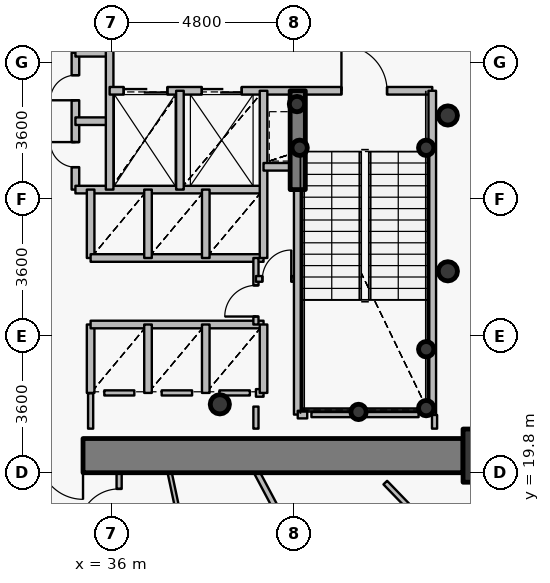
"""IFC4 building model, lengths in metres.
Left out: names, types, materials, properties, quantities, classifications, styles, units other than length and angle.
Written with IfcOpenShell. Run it as: python <this file> out.ifc"""

import sys

from ifc_helpers import new_model, si_unit, direction, frame, frame_2d, origin, origin_2d, place, context, subcontext, project, spatial, rectangle, hollow_circle, extrude, source, transform, mapped, element, fill, save


model = new_model("IFC4")
c1 = context("Model", 3, precision=1e-05, world=origin(), true_north=direction((0.0, 1.0)))
c2 = subcontext(c1, "Body", "Model", "MODEL_VIEW")
j1 = project(units=[si_unit("LENGTHUNIT", "METRE"), si_unit("PLANEANGLEUNIT", "RADIAN")], contexts=[c1])
p1 = place(None, origin())
s1 = spatial("IfcSite", under=j1, at=p1, CompositionType="ELEMENT")
p2 = place(p1, origin())
s2 = spatial("IfcBuilding", under=s1, at=p2, CompositionType="ELEMENT")
p3 = place(p2, frame((0.0, 0.0, 14.4)))
s3 = spatial("IfcBuildingStorey", under=s2, at=p3, CompositionType="ELEMENT", Elevation=14.4)
p4 = place(p3, frame((45.95, 20.25, 0.0), z_axis=(0.0, 0.0, 1.0), x_axis=(1.0, 0.0, 0.0)))
e1 = element("IfcColumn", 1, at=p4, inside=s3, PredefinedType="COLUMN", context=c2, shape_type="SweptSolid", body=[
    extrude(rectangle(XDim=1.4, YDim=1.4, at=origin_2d()), origin(), (0.0, 0.0, 1.0), 4.2),
])
p5 = place(p3, frame((38.85, 21.6, 0.0), z_axis=(0.0, 0.0, 1.0), x_axis=(1.0, 0.0, 0.0)))
e2 = element("IfcColumn", 2, at=p5, inside=s3, PredefinedType="COLUMN", context=c2, shape_type="SweptSolid", body=[
    extrude(hollow_circle(Radius=0.254, WallThickness=0.02, at=origin_2d()), origin(), (0.0, 0.0, 1.0), 4.2),
])
for number, where, z_axis, x_axis in (
    (3, (44.28, 21.5, 0.0), (0.0, 0.0, 1.0), (1.0, 0.0, 0.0)),
    (4, (44.28, 23.05, 0.0), (0.0, 0.0, 1.0), (1.0, 0.0, 0.0)),
    (5, (42.5, 21.4, 0.0), (0.0, 0.0, 1.0), (1.0, 0.0, 0.0)),
    (6, (40.95, 28.35, 0.0), (0.0, 0.0, 1.0), (1.0, 0.0, 0.0)),
    (7, (44.28, 28.35, 0.0), (0.0, 0.0, 1.0), (1.0, 0.0, 0.0)),
    (8, (40.88, 29.5, 0.0), (0.0, 0.0, 1.0), (1.0, 0.0, 0.0)),
):
    element("IfcColumn", number, at=place(p3, frame(where, z_axis=z_axis, x_axis=x_axis)), inside=s3, PredefinedType="COLUMN", context=c2, shape_type="SweptSolid", body=[
        extrude(hollow_circle(Radius=0.203, WallThickness=0.016, at=origin_2d()), origin(), (0.0, 0.0, 1.0), 4.2),
    ])
p6 = place(p3, frame((45.25, 20.25, 0.0), z_axis=(0.0, 0.0, 1.0), x_axis=(-1.0, 0.0, 0.0)))
e9 = element("IfcWall", 9, at=p6, inside=s3, PredefinedType="SHEAR", context=c2, shape_type="SweptSolid", body=[
    extrude(rectangle(XDim=18.5, YDim=0.9, at=frame_2d((9.25, 0.0))), origin(), (0.0, 0.0, 1.0), 3.35),
])
p7 = place(p6, frame((10.0, 0.0, 0.0)))
e10 = element("IfcOpeningElement", 10, at=p7, cuts=e9, PredefinedType="OPENING", context=c2, shape_type="SweptSolid", body=[
    extrude(rectangle(XDim=1.15, YDim=2.15, at=origin_2d()), frame((0.575, 0.46, 1.075), z_axis=(0.0, -1.0, 0.0), x_axis=(1.0, 0.0, 0.0)), (0.0, 0.0, 1.0), 0.92),
])
p8 = place(p3, frame((40.9, 27.25, 0.0), z_axis=(0.0, 0.0, 1.0), x_axis=(0.0, 1.0, 0.0)))
e11 = element("IfcWall", 11, at=p8, inside=s3, PredefinedType="SHEAR", context=c2, shape_type="SweptSolid", body=[
    extrude(rectangle(XDim=2.6, YDim=0.4, at=frame_2d((1.3, 0.0))), origin(), (0.0, 0.0, 1.0), 3.5),
])
for number, where, z_axis, x_axis in (
    (12, (44.85, 25.1, 0.0), (0.0, 0.0, 1.0), (1.0, 0.0, 0.0)),
    (13, (44.85, 29.2, 0.0), (0.0, 0.0, 1.0), (1.0, 0.0, 0.0)),
):
    element("IfcColumn", number, at=place(p3, frame(where, z_axis=z_axis, x_axis=x_axis)), inside=s3, PredefinedType="COLUMN", context=c2, shape_type="SweptSolid", body=[
        extrude(hollow_circle(Radius=0.254, WallThickness=0.02, at=origin_2d()), origin(), (0.0, 0.0, 1.0), 4.2),
    ])
p9 = place(p3, frame((35.05, 27.25, 0.0), z_axis=(0.0, 0.0, 1.0), x_axis=(0.0, 1.0, 0.0)))
e14 = element("IfcWall", 14, at=p9, inside=s3, PredefinedType="PARTITIONING", context=c2, shape_type="SweptSolid", body=[
    extrude(rectangle(XDim=3.6, YDim=0.2, at=frame_2d((1.8, 0.0))), origin(), (0.0, 0.0, 1.0), 3.9),
])
p10 = place(p9, frame((0.59, 0.0, 0.0)))
e15 = element("IfcOpeningElement", 15, at=p10, cuts=e14, PredefinedType="OPENING", context=c2, shape_type="SweptSolid", body=[
    extrude(rectangle(XDim=0.66, YDim=2.05, at=origin_2d()), frame((0.33, 0.11, 1.025), z_axis=(0.0, -1.0, 0.0), x_axis=(1.0, 0.0, 0.0)), (0.0, 0.0, 1.0), 0.22),
])
p11 = place(p9, frame((2.35, 0.0, 0.0)))
e16 = element("IfcOpeningElement", 16, at=p11, cuts=e14, PredefinedType="OPENING", context=c2, shape_type="SweptSolid", body=[
    extrude(rectangle(XDim=0.66, YDim=2.05, at=origin_2d()), frame((0.33, 0.11, 1.025), z_axis=(0.0, -1.0, 0.0), x_axis=(1.0, 0.0, 0.0)), (0.0, 0.0, 1.0), 0.22),
])
p12 = place(p3, frame((35.05, 27.25, 0.0), z_axis=(0.0, 0.0, 1.0), x_axis=(1.0, 0.0, 0.0)))
e17 = element("IfcWall", 17, at=p12, inside=s3, PredefinedType="PARTITIONING", context=c2, shape_type="SweptSolid", body=[
    extrude(rectangle(XDim=4.95, YDim=0.2, at=frame_2d((2.475, 0.0))), origin(), (0.0, 0.0, 1.0), 3.485),
])
for number, where, z_axis, x_axis in (
    (18, (35.05, 29.05, 0.0), (0.0, 0.0, 1.0), (1.0, 0.0, 0.0)),
    (19, (35.05, 30.85, 0.0), (0.0, 0.0, 1.0), (1.0, 0.0, 0.0)),
):
    element("IfcWall", number, at=place(p3, frame(where, z_axis=z_axis, x_axis=x_axis)), inside=s3, PredefinedType="PARTITIONING", context=c2, shape_type="SweptSolid", body=[
        extrude(rectangle(XDim=0.9, YDim=0.2, at=frame_2d((0.45, 0.0))), origin(), (0.0, 0.0, 1.0), 3.9),
    ])
p13 = place(p3, frame((35.45, 21.9, 0.0), z_axis=(0.0, 0.0, 1.0), x_axis=(0.0, 1.0, 0.0)))
e20 = element("IfcWall", 20, at=p13, inside=s3, PredefinedType="PARTITIONING", context=c2, shape_type="SweptSolid", body=[
    extrude(rectangle(XDim=1.8, YDim=0.2, at=frame_2d((0.9, 0.0))), origin(), (0.0, 0.0, 1.0), 3.9),
])
p14 = place(p3, frame((35.45, 23.7, 0.0), z_axis=(0.0, 0.0, 1.0), x_axis=(1.0, 0.0, 0.0)))
e21 = element("IfcWall", 21, at=p14, inside=s3, PredefinedType="PARTITIONING", context=c2, shape_type="SweptSolid", body=[
    extrude(rectangle(XDim=4.55, YDim=0.2, at=frame_2d((2.275, 0.0))), origin(), (0.0, 0.0, 1.0), 3.485),
])
p15 = place(p3, frame((35.45, 25.45, 0.0), z_axis=(0.0, 0.0, 1.0), x_axis=(0.0, 1.0, 0.0)))
e22 = element("IfcWall", 22, at=p15, inside=s3, PredefinedType="PARTITIONING", context=c2, shape_type="SweptSolid", body=[
    extrude(rectangle(XDim=1.8, YDim=0.2, at=frame_2d((0.9, 0.0))), origin(), (0.0, 0.0, 1.0), 3.9),
])
p16 = place(p3, frame((35.45, 25.45, 0.0), z_axis=(0.0, 0.0, 1.0), x_axis=(1.0, 0.0, 0.0)))
e23 = element("IfcWall", 23, at=p16, inside=s3, PredefinedType="PARTITIONING", context=c2, shape_type="SweptSolid", body=[
    extrude(rectangle(XDim=4.55, YDim=0.2, at=frame_2d((2.275, 0.0))), origin(), (0.0, 0.0, 1.0), 3.485),
])
p17 = place(p3, frame((35.95, 27.25, 0.0), z_axis=(0.0, 0.0, 1.0), x_axis=(0.0, 1.0, 0.0)))
e24 = element("IfcWall", 24, at=p17, inside=s3, PredefinedType="PARTITIONING", context=c2, shape_type="SweptSolid", body=[
    extrude(rectangle(XDim=3.8, YDim=0.2, at=frame_2d((1.9, 0.0))), origin(), (0.0, 0.0, 1.0), 3.9),
])
p18 = place(p3, frame((35.95, 29.85, 0.0), z_axis=(0.0, 0.0, 1.0), x_axis=(1.0, 0.0, 0.0)))
e25 = element("IfcWall", 25, at=p18, inside=s3, PredefinedType="PARTITIONING", context=c2, shape_type="SweptSolid", body=[
    extrude(rectangle(XDim=8.49, YDim=0.2, at=frame_2d((4.245, 0.0))), origin(), (0.0, 0.0, 1.0), 3.485),
])
p19 = place(p18, frame((6.1, 0.0, 0.0)))
e26 = element("IfcOpeningElement", 26, at=p19, cuts=e25, PredefinedType="OPENING", context=c2, shape_type="SweptSolid", body=[
    extrude(rectangle(XDim=1.2, YDim=2.15, at=origin_2d()), frame((0.6, 0.11, 1.075), z_axis=(0.0, -1.0, 0.0), x_axis=(1.0, 0.0, 0.0)), (0.0, 0.0, 1.0), 0.22),
])
p20 = place(p18, frame((0.37, 0.0, 0.0)))
e27 = element("IfcOpeningElement", 27, at=p20, cuts=e25, PredefinedType="OPENING", context=c2, shape_type="SweptSolid", body=[
    extrude(rectangle(XDim=1.15, YDim=2.15, at=origin_2d()), frame((0.575, 0.11, 1.075), z_axis=(0.0, -1.0, 0.0), x_axis=(1.0, 0.0, 0.0)), (0.0, 0.0, 1.0), 0.22),
])
p21 = place(p18, frame((2.425, 0.0, 0.0)))
e28 = element("IfcOpeningElement", 28, at=p21, cuts=e25, PredefinedType="OPENING", context=c2, shape_type="SweptSolid", body=[
    extrude(rectangle(XDim=1.05, YDim=2.15, at=origin_2d()), frame((0.525, 0.11, 1.075), z_axis=(0.0, -1.0, 0.0), x_axis=(1.0, 0.0, 0.0)), (0.0, 0.0, 1.0), 0.22),
])
p22 = place(p3, frame((36.2, 17.9, 0.0), z_axis=(0.0, 0.0, 1.0), x_axis=(0.0, 1.0, 0.0)))
e29 = element("IfcWall", 29, at=p22, inside=s3, PredefinedType="PARTITIONING", context=c2, shape_type="SweptSolid", body=[
    extrude(rectangle(XDim=1.9, YDim=0.135, at=frame_2d((0.95, 0.0))), origin(), (0.0, 0.0, 1.0), 3.085),
])
p23 = place(p22, frame((0.425, 0.0, 0.0)))
e30 = element("IfcOpeningElement", 30, at=p23, cuts=e29, PredefinedType="OPENING", context=c2, shape_type="SweptSolid", body=[
    extrude(rectangle(XDim=1.05, YDim=2.15, at=origin_2d()), frame((0.525, 0.078, 1.075), z_axis=(0.0, -1.0, 0.0), x_axis=(1.0, 0.0, 0.0)), (0.0, 0.0, 1.0), 0.155),
])
for number, where, z_axis, x_axis in (
    (31, (36.96, 21.9, 0.0), (0.0, 0.0, 1.0), (0.0, 1.0, 0.0)),
    (32, (36.96, 25.45, 0.0), (0.0, 0.0, 1.0), (0.0, 1.0, 0.0)),
):
    element("IfcWall", number, at=place(p3, frame(where, z_axis=z_axis, x_axis=x_axis)), inside=s3, PredefinedType="PARTITIONING", context=c2, shape_type="SweptSolid", body=[
        extrude(rectangle(XDim=1.8, YDim=0.2, at=frame_2d((0.9, 0.0))), origin(), (0.0, 0.0, 1.0), 3.9),
    ])
p24 = place(p3, frame((37.531, 19.8, 0.0), z_axis=(0.0, 0.0, 1.0), x_axis=(0.207904603096, -0.978149107249, 0.0)))
e33 = element("IfcWall", 33, at=p24, inside=s3, PredefinedType="MOVABLE", context=c2, shape_type="SweptSolid", body=[
    extrude(rectangle(XDim=18.724, YDim=0.11, at=frame_2d((9.362, 0.0))), origin(), (0.0, 0.0, 1.0), 3.085),
])
p25 = place(p24, frame((8.837, 0.0, 0.0)))
e34 = element("IfcOpeningElement", 34, at=p25, cuts=e33, PredefinedType="OPENING", context=c2, shape_type="SweptSolid", body=[
    extrude(rectangle(XDim=1.05, YDim=2.15, at=origin_2d()), frame((0.525, 0.065, 1.075), z_axis=(0.0, -1.0, 0.0), x_axis=(1.0, 0.0, 0.0)), (0.0, 0.0, 1.0), 0.13),
])
p26 = place(p3, frame((37.8, 27.25, 0.0), z_axis=(0.0, 0.0, 1.0), x_axis=(0.0, 1.0, 0.0)))
e35 = element("IfcWall", 35, at=p26, inside=s3, PredefinedType="PARTITIONING", context=c2, shape_type="SweptSolid", body=[
    extrude(rectangle(XDim=2.6, YDim=0.2, at=frame_2d((1.3, 0.0))), origin(), (0.0, 0.0, 1.0), 3.9),
])
for number, where, z_axis, x_axis in (
    (36, (38.48, 21.9, 0.0), (0.0, 0.0, 1.0), (0.0, 1.0, 0.0)),
    (37, (38.48, 25.45, 0.0), (0.0, 0.0, 1.0), (0.0, 1.0, 0.0)),
):
    element("IfcWall", number, at=place(p3, frame(where, z_axis=z_axis, x_axis=x_axis)), inside=s3, PredefinedType="PARTITIONING", context=c2, shape_type="SweptSolid", body=[
        extrude(rectangle(XDim=1.8, YDim=0.2, at=frame_2d((0.9, 0.0))), origin(), (0.0, 0.0, 1.0), 3.9),
    ])
p27 = place(p3, frame((39.8, 21.9, 0.0), z_axis=(0.0, 0.0, 1.0), x_axis=(1.0, 0.0, 0.0)))
e38 = element("IfcWall", 38, at=p27, inside=s3, PredefinedType="PARTITIONING", context=c2, shape_type="SweptSolid", body=[
    extrude(rectangle(XDim=0.2, YDim=0.2, at=frame_2d((0.1, 0.0))), origin(), (0.0, 0.0, 1.0), 3.9),
])
p28 = place(p3, frame((39.8, 23.7, 0.0), z_axis=(0.0, 0.0, 1.0), x_axis=(0.0, 1.0, 0.0)))
e39 = element("IfcWall", 39, at=p28, inside=s3, PredefinedType="PARTITIONING", context=c2, shape_type="SweptSolid", body=[
    extrude(rectangle(XDim=1.75, YDim=0.135, at=frame_2d((0.875, 0.0))), origin(), (0.0, 0.0, 1.0), 3.9),
])
p29 = place(p28, frame((0.21, 0.0, 0.0)))
e40 = element("IfcOpeningElement", 40, at=p29, cuts=e39, PredefinedType="OPENING", context=c2, shape_type="SweptSolid", body=[
    extrude(rectangle(XDim=0.82, YDim=2.1, at=origin_2d()), frame((0.41, 0.078, 1.05), z_axis=(0.0, -1.0, 0.0), x_axis=(1.0, 0.0, 0.0)), (0.0, 0.0, 1.0), 0.155),
])
p30 = place(p3, frame((39.8, 24.9, 0.0), z_axis=(0.0, 0.0, 1.0), x_axis=(1.0, 0.0, 0.0)))
e41 = element("IfcWall", 41, at=p30, inside=s3, PredefinedType="PARTITIONING", context=c2, shape_type="SweptSolid", body=[
    extrude(rectangle(XDim=1.1, YDim=0.15, at=frame_2d((0.55, 0.0))), origin(), (0.0, 0.0, 1.0), 3.9),
])
p31 = place(p30, frame((0.17, 0.0, 0.0)))
e42 = element("IfcOpeningElement", 42, at=p31, cuts=e41, PredefinedType="OPENING", context=c2, shape_type="SweptSolid", body=[
    extrude(rectangle(XDim=0.76, YDim=2.1, at=origin_2d()), frame((0.38, 0.085, 1.05), z_axis=(0.0, -1.0, 0.0), x_axis=(1.0, 0.0, 0.0)), (0.0, 0.0, 1.0), 0.17),
])
p32 = place(p3, frame((39.828, 19.8, 0.0), z_axis=(0.0, 0.0, 1.0), x_axis=(0.469463695446, -0.882951775953, 0.0)))
e43 = element("IfcWall", 43, at=p32, inside=s3, PredefinedType="PARTITIONING", context=c2, shape_type="SweptSolid", body=[
    extrude(rectangle(XDim=18.824, YDim=0.15, at=frame_2d((9.412, 0.0))), origin(), (0.0, 0.0, 1.0), 3.085),
])
p33 = place(p3, frame((40.0, 21.9, 0.0), z_axis=(0.0, 0.0, 1.0), x_axis=(0.0, 1.0, 0.0)))
e44 = element("IfcWall", 44, at=p33, inside=s3, PredefinedType="PARTITIONING", context=c2, shape_type="SweptSolid", body=[
    extrude(rectangle(XDim=1.8, YDim=0.2, at=frame_2d((0.9, 0.0))), origin(), (0.0, 0.0, 1.0), 3.9),
])
p34 = place(p3, frame((40.0, 25.45, 0.0), z_axis=(0.0, 0.0, 1.0), x_axis=(0.0, 1.0, 0.0)))
e45 = element("IfcWall", 45, at=p34, inside=s3, PredefinedType="PARTITIONING", context=c2, shape_type="SweptSolid", body=[
    extrude(rectangle(XDim=4.4, YDim=0.2, at=frame_2d((2.2, 0.0))), origin(), (0.0, 0.0, 1.0), 3.9),
])
p35 = place(p3, frame((40.0, 27.85, 0.0), z_axis=(0.0, 0.0, 1.0), x_axis=(1.0, 0.0, 0.0)))
e46 = element("IfcWall", 46, at=p35, inside=s3, PredefinedType="PARTITIONING", context=c2, shape_type="SweptSolid", body=[
    extrude(rectangle(XDim=0.9, YDim=0.2, at=frame_2d((0.45, 0.0))), origin(), (0.0, 0.0, 1.0), 3.9),
])
p36 = place(p3, frame((40.9, 21.33, 0.0), z_axis=(0.0, 0.0, 1.0), x_axis=(0.0, 1.0, 0.0)))
e47 = element("IfcWall", 47, at=p36, inside=s3, PredefinedType="PARTITIONING", context=c2, shape_type="SweptSolid", body=[
    extrude(rectangle(XDim=5.91, YDim=0.2, at=frame_2d((2.955, 0.0))), origin(), (0.0, 0.0, 1.0), 3.435),
])
p37 = place(p3, frame((40.9, 21.33, 0.0), z_axis=(0.0, 0.0, 1.0), x_axis=(1.0, 0.0, 0.0)))
e48 = element("IfcWall", 48, at=p37, inside=s3, PredefinedType="PARTITIONING", context=c2, shape_type="SweptSolid", body=[
    extrude(rectangle(XDim=0.25, YDim=0.2, at=frame_2d((0.125, 0.0))), origin(), (0.0, 0.0, 1.0), 3.435),
])
p38 = place(p3, frame((44.44, 21.33, 0.0), z_axis=(0.0, 0.0, 1.0), x_axis=(0.0, 1.0, 0.0)))
e49 = element("IfcWall", 49, at=p38, inside=s3, PredefinedType="PARTITIONING", context=c2, shape_type="SweptSolid", body=[
    extrude(rectangle(XDim=8.52, YDim=0.2, at=frame_2d((4.26, 0.0))), origin(), (0.0, 0.0, 1.0), 3.9),
])
p39 = place(p3, frame((44.08, 21.33, 0.0), z_axis=(0.0, 0.0, 1.0), x_axis=(-1.0, 0.0, 0.0)))
e50 = element("IfcWall", 50, at=p39, inside=s3, PredefinedType="PARTITIONING", context=c2, shape_type="SweptSolid", body=[
    extrude(rectangle(XDim=2.82, YDim=0.135, at=frame_2d((1.41, 0.0))), origin(), (0.0, 0.0, 1.0), 3.435),
])
p40 = place(p3, frame((36.6, 21.9, 0.0), z_axis=(0.0, 0.0, 1.0), x_axis=(-1.0, 0.0, 0.0)))
e51 = element("IfcWall", 51, at=p40, inside=s3, PredefinedType="PARTITIONING", context=c2, shape_type="SweptSolid", body=[
    extrude(rectangle(XDim=0.79, YDim=0.135, at=frame_2d((0.395, 0.0))), origin(), (0.0, 0.0, 1.0), 3.9),
])
p41 = place(p3, frame((38.12, 21.9, 0.0), z_axis=(0.0, 0.0, 1.0), x_axis=(-1.0, 0.0, 0.0)))
e52 = element("IfcWall", 52, at=p41, inside=s3, PredefinedType="PARTITIONING", context=c2, shape_type="SweptSolid", body=[
    extrude(rectangle(XDim=0.8, YDim=0.135, at=frame_2d((0.4, 0.0))), origin(), (0.0, 0.0, 1.0), 3.9),
])
p42 = place(p3, frame((39.64, 21.9, 0.0), z_axis=(0.0, 0.0, 1.0), x_axis=(-1.0, 0.0, 0.0)))
e53 = element("IfcWall", 53, at=p42, inside=s3, PredefinedType="PARTITIONING", context=c2, shape_type="SweptSolid", body=[
    extrude(rectangle(XDim=0.8, YDim=0.135, at=frame_2d((0.4, 0.0))), origin(), (0.0, 0.0, 1.0), 3.485),
])
p43 = place(p3, frame((39.8, 20.96, 0.0), z_axis=(0.0, 0.0, 1.0), x_axis=(0.0, 1.0, 0.0)))
e54 = element("IfcWall", 54, at=p43, inside=s3, PredefinedType="PARTITIONING", context=c2, shape_type="SweptSolid", body=[
    extrude(rectangle(XDim=0.58, YDim=0.135, at=frame_2d((0.29, 0.0))), origin(), (0.0, 0.0, 1.0), 3.435),
])
p44 = place(p3, frame((44.5, 20.96, 0.0), z_axis=(0.0, 0.0, 1.0), x_axis=(0.0, 1.0, 0.0)))
e55 = element("IfcWall", 55, at=p44, inside=s3, PredefinedType="PARTITIONING", context=c2, shape_type="SweptSolid", body=[
    extrude(rectangle(XDim=0.36, YDim=0.135, at=frame_2d((0.18, 0.0))), origin(), (0.0, 0.0, 1.0), 3.9),
])
p45 = place(p3, frame((35.45, 21.89, 0.0), z_axis=(0.0, 0.0, 1.0), x_axis=(0.0, -1.0, 0.0)))
e56 = element("IfcWall", 56, at=p45, inside=s3, PredefinedType="PARTITIONING", context=c2, shape_type="SweptSolid", body=[
    extrude(rectangle(XDim=0.93, YDim=0.135, at=frame_2d((0.465, 0.0))), origin(), (0.0, 0.0, 1.0), 3.485),
])
p46 = place(p3, frame((43.204, 19.54, 0.0), z_axis=(0.0, 0.0, 1.0), x_axis=(0.694638628507, -0.719358864397, 0.0)))
e57 = element("IfcWall", 57, at=p46, inside=s3, PredefinedType="PARTITIONING", context=c2, shape_type="SweptSolid", body=[
    extrude(rectangle(XDim=3.654, YDim=0.135, at=frame_2d((1.827, 0.0))), origin(), (0.0, 0.0, 1.0), 3.9),
])
m1 = source(origin(), c2, "Body", "SweptSolid", [
    extrude(rectangle(XDim=1.15, YDim=2.15, at=origin_2d()), frame((0.575, 0.025, 1.075), z_axis=(0.0, -1.0, 0.0), x_axis=(1.0, 0.0, 0.0)), (0.0, 0.0, 1.0), 0.05),
])
p47 = place(p7, origin())
e58 = element("IfcDoor", 58, at=p47, inside=s3, OperationType="SINGLE_SWING_LEFT", PredefinedType="DOOR", context=c2, shape_type="MappedRepresentation", body=[
    mapped(m1, transform((0.0, 0.0, 0.0), x_axis=(1.0, 0.0, 0.0), y_axis=(0.0, 1.0, 0.0), z_axis=(0.0, 0.0, 1.0), scale=1.0)),
])
fill(e10, e58)
m2 = source(origin(), c2, "Body", "SweptSolid", [
    extrude(rectangle(XDim=1.2, YDim=2.15, at=origin_2d()), frame((0.6, 0.025, 1.075), z_axis=(0.0, -1.0, 0.0), x_axis=(1.0, 0.0, 0.0)), (0.0, 0.0, 1.0), 0.05),
])
p48 = place(p19, origin())
e59 = element("IfcDoor", 59, at=p48, inside=s3, OperationType="SINGLE_SWING_LEFT", PredefinedType="DOOR", context=c2, shape_type="MappedRepresentation", body=[
    mapped(m2, transform((0.0, 0.0, 0.0), x_axis=(1.0, 0.0, 0.0), y_axis=(0.0, 1.0, 0.0), z_axis=(0.0, 0.0, 1.0), scale=1.0)),
])
fill(e26, e59)
m3 = source(origin(), c2, "Body", "SweptSolid", [
    extrude(rectangle(XDim=1.15, YDim=2.15, at=origin_2d()), frame((0.575, 0.025, 1.075), z_axis=(0.0, -1.0, 0.0), x_axis=(1.0, 0.0, 0.0)), (0.0, 0.0, 1.0), 0.05),
])
p49 = place(p20, origin())
e60 = element("IfcDoor", 60, at=p49, inside=s3, OperationType="DOUBLE_DOOR_SLIDING", PredefinedType="USERDEFINED", context=c2, shape_type="MappedRepresentation", body=[
    mapped(m3, transform((0.0, 0.0, 0.0), x_axis=(1.0, 0.0, 0.0), y_axis=(0.0, 1.0, 0.0), z_axis=(0.0, 0.0, 1.0), scale=1.0)),
])
fill(e27, e60)
m4 = source(origin(), c2, "Body", "SweptSolid", [
    extrude(rectangle(XDim=1.05, YDim=2.15, at=origin_2d()), frame((0.525, 0.025, 1.075), z_axis=(0.0, -1.0, 0.0), x_axis=(1.0, 0.0, 0.0)), (0.0, 0.0, 1.0), 0.05),
])
p50 = place(p21, origin())
e61 = element("IfcDoor", 61, at=p50, inside=s3, OperationType="DOUBLE_DOOR_SLIDING", PredefinedType="USERDEFINED", context=c2, shape_type="MappedRepresentation", body=[
    mapped(m4, transform((0.0, 0.0, 0.0), x_axis=(1.0, 0.0, 0.0), y_axis=(0.0, 1.0, 0.0), z_axis=(0.0, 0.0, 1.0), scale=1.0)),
])
fill(e28, e61)
m5 = source(origin(), c2, "Body", "SweptSolid", [
    extrude(rectangle(XDim=0.66, YDim=2.05, at=origin_2d()), frame((0.33, 0.025, 1.025), z_axis=(0.0, -1.0, 0.0), x_axis=(1.0, 0.0, 0.0)), (0.0, 0.0, 1.0), 0.05),
])
p51 = place(p10, origin())
e62 = element("IfcDoor", 62, at=p51, inside=s3, OperationType="SINGLE_SWING_RIGHT", PredefinedType="USERDEFINED", context=c2, shape_type="MappedRepresentation", body=[
    mapped(m5, transform((0.0, 0.0, 0.0), x_axis=(1.0, 0.0, 0.0), y_axis=(0.0, 1.0, 0.0), z_axis=(0.0, 0.0, 1.0), scale=1.0)),
])
fill(e15, e62)
p52 = place(p11, origin())
e63 = element("IfcDoor", 63, at=p52, inside=s3, OperationType="SINGLE_SWING_LEFT", PredefinedType="USERDEFINED", context=c2, shape_type="MappedRepresentation", body=[
    mapped(m5, transform((0.0, 0.0, 0.0), x_axis=(1.0, 0.0, 0.0), y_axis=(0.0, 1.0, 0.0), z_axis=(0.0, 0.0, 1.0), scale=1.0)),
])
fill(e16, e63)
m6 = source(origin(), c2, "Body", "SweptSolid", [
    extrude(rectangle(XDim=0.82, YDim=2.1, at=origin_2d()), frame((0.41, 0.025, 1.05), z_axis=(0.0, -1.0, 0.0), x_axis=(1.0, 0.0, 0.0)), (0.0, 0.0, 1.0), 0.05),
])
p53 = place(p29, origin())
e64 = element("IfcDoor", 64, at=p53, inside=s3, OperationType="SINGLE_SWING_LEFT", PredefinedType="DOOR", context=c2, shape_type="MappedRepresentation", body=[
    mapped(m6, transform((0.0, 0.0, 0.0), x_axis=(1.0, 0.0, 0.0), y_axis=(0.0, 1.0, 0.0), z_axis=(0.0, 0.0, 1.0), scale=1.0)),
])
fill(e40, e64)
m7 = source(origin(), c2, "Body", "SweptSolid", [
    extrude(rectangle(XDim=0.76, YDim=2.1, at=origin_2d()), frame((0.38, 0.025, 1.05), z_axis=(0.0, -1.0, 0.0), x_axis=(1.0, 0.0, 0.0)), (0.0, 0.0, 1.0), 0.05),
])
p54 = place(p31, origin())
e65 = element("IfcDoor", 65, at=p54, inside=s3, OperationType="SINGLE_SWING_RIGHT", PredefinedType="DOOR", context=c2, shape_type="MappedRepresentation", body=[
    mapped(m7, transform((0.0, 0.0, 0.0), x_axis=(1.0, 0.0, 0.0), y_axis=(0.0, 1.0, 0.0), z_axis=(0.0, 0.0, 1.0), scale=1.0)),
])
fill(e42, e65)
m8 = source(origin(), c2, "Body", "SweptSolid", [
    extrude(rectangle(XDim=1.05, YDim=2.15, at=origin_2d()), frame((0.525, 0.025, 1.075), z_axis=(0.0, -1.0, 0.0), x_axis=(1.0, 0.0, 0.0)), (0.0, 0.0, 1.0), 0.05),
])
p55 = place(p23, origin())
e66 = element("IfcDoor", 66, at=p55, inside=s3, OperationType="SINGLE_SWING_LEFT", PredefinedType="DOOR", context=c2, shape_type="MappedRepresentation", body=[
    mapped(m8, transform((0.0, 0.0, 0.0), x_axis=(1.0, 0.0, 0.0), y_axis=(0.0, 1.0, 0.0), z_axis=(0.0, 0.0, 1.0), scale=1.0)),
])
fill(e30, e66)
save(model, sys.argv[1])
